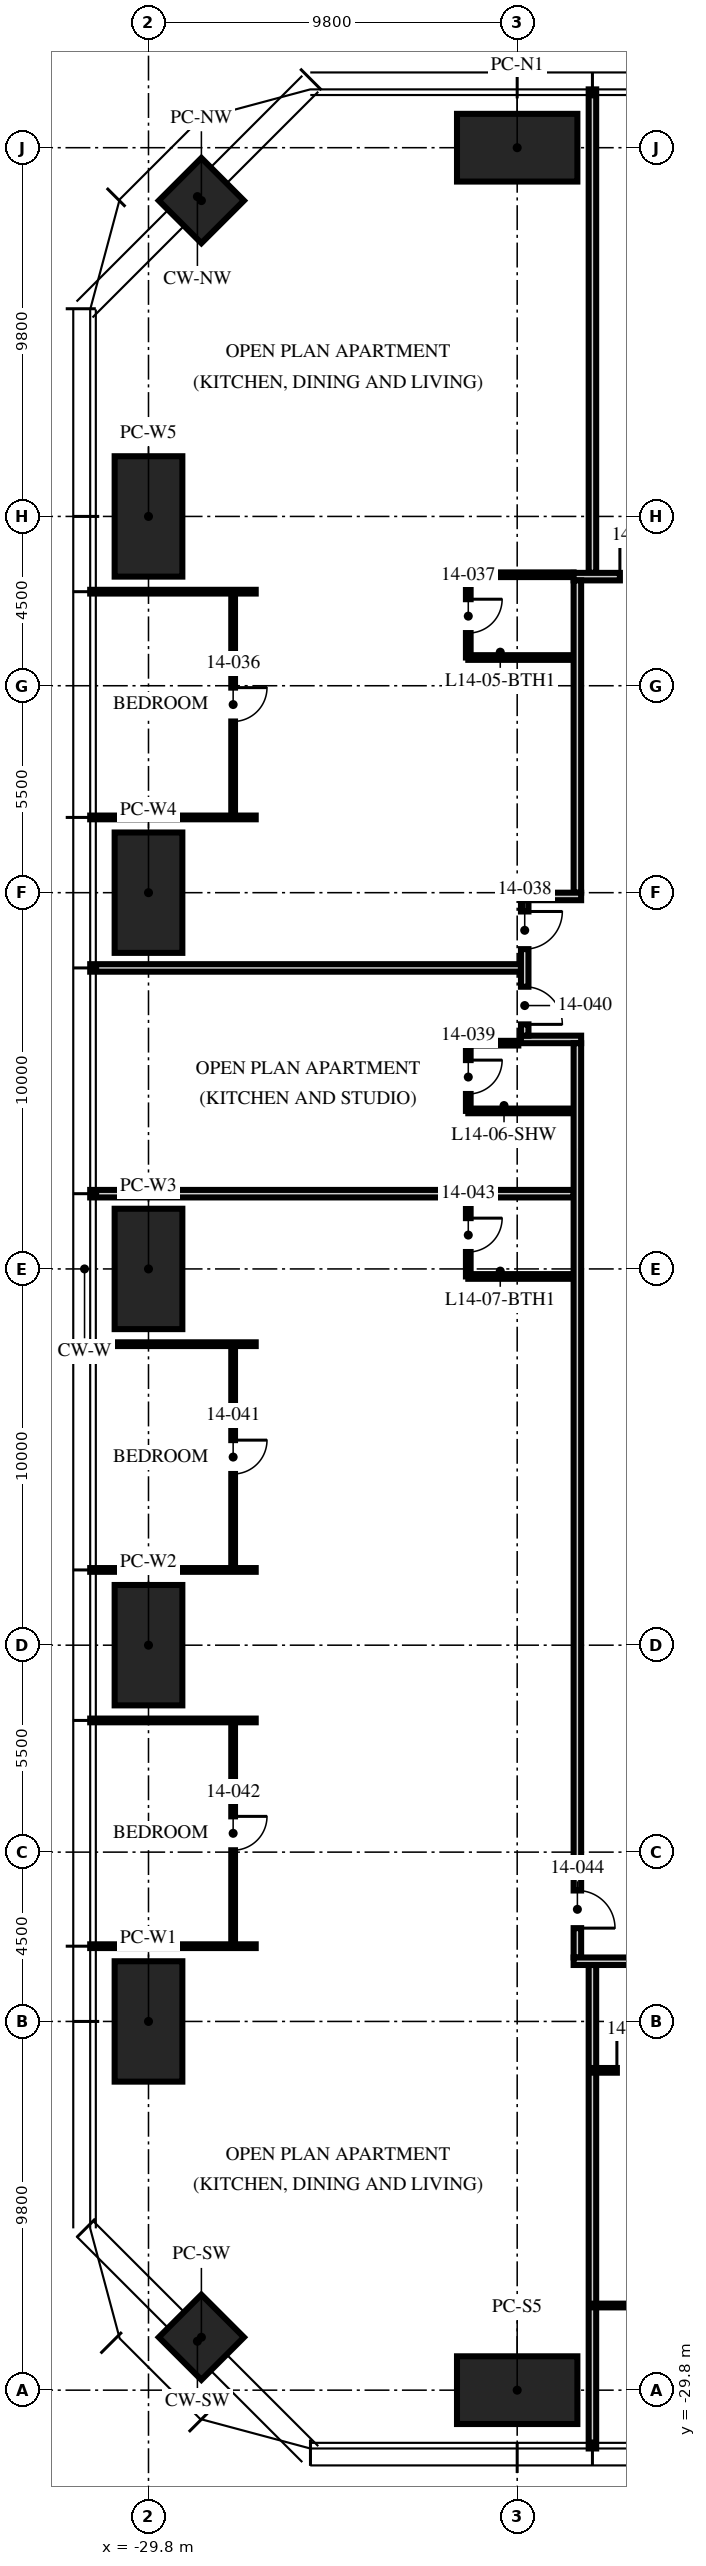
"""IFC4 building model, lengths in metres.
Left out: names, types, materials, properties, quantities, classifications, styles, units other than length and angle.
Written with IfcOpenShell. Run it as: python <this file> out.ifc"""

import sys

from ifc_helpers import new_model, si_unit, direction, frame, frame_2d, origin, origin_2d, place, context, subcontext, project, spatial, rectangle, hollow_rectangle, extrude, element, fill, save


model = new_model("IFC4")
c1 = context("Model", 3, precision=1e-05, world=origin(), true_north=direction((0.0, 1.0)))
c2 = subcontext(c1, "Body", "Model", "MODEL_VIEW")
j1 = project(units=[si_unit("LENGTHUNIT", "METRE"), si_unit("PLANEANGLEUNIT", "RADIAN")], contexts=[c1])
p1 = place(None, origin())
s1 = spatial("IfcSite", under=j1, at=p1, CompositionType="ELEMENT")
p2 = place(p1, origin())
s2 = spatial("IfcBuilding", under=s1, at=p2, CompositionType="ELEMENT")
p3 = place(p2, frame((0.0, 0.0, 58.5)))
s3 = spatial("IfcBuildingStorey", under=s2, at=p3, CompositionType="ELEMENT", Elevation=58.5)
for number, where, z_axis, x_axis in (
    (1, (-20.0, 29.8, 0.0), (0.0, 0.0, 1.0), (1.0, 0.0, 0.0)),
    (2, (-20.0, -29.8, 0.0), (0.0, 0.0, 1.0), (1.0, 0.0, 0.0)),
    (3, (-29.8, -20.0, 0.0), (0.0, 0.0, 1.0), (0.0, 1.0, 0.0)),
    (4, (-29.8, -10.0, 0.0), (0.0, 0.0, 1.0), (0.0, 1.0, 0.0)),
    (5, (-29.8, 0.0, 0.0), (0.0, 0.0, 1.0), (0.0, 1.0, 0.0)),
    (6, (-29.8, 10.0, 0.0), (0.0, 0.0, 1.0), (0.0, 1.0, 0.0)),
    (7, (-29.8, 20.0, 0.0), (0.0, 0.0, 1.0), (0.0, 1.0, 0.0)),
):
    element("IfcColumn", number, at=place(p3, frame(where, z_axis=z_axis, x_axis=x_axis)), inside=s3, PredefinedType="COLUMN", context=c2, shape_type="SweptSolid", body=[
        extrude(hollow_rectangle(XDim=3.2, YDim=1.8, WallThickness=0.2, at=origin_2d()), origin(), (0.0, 0.0, 1.0), 3.75),
    ])
for number, where, z_axis, x_axis in (
    (8, (-28.394, -28.394, 0.0), (0.0, 0.0, 1.0), (0.707, -0.707, 0.0)),
    (9, (-28.394, 28.394, 0.0), (0.0, 0.0, 1.0), (0.707, 0.707, 0.0)),
):
    element("IfcColumn", number, at=place(p3, frame(where, z_axis=z_axis, x_axis=x_axis)), inside=s3, PredefinedType="COLUMN", context=c2, shape_type="SweptSolid", body=[
        extrude(hollow_rectangle(XDim=1.6, YDim=1.6, WallThickness=0.1, at=origin_2d()), origin(), (0.0, 0.0, 1.0), 3.75),
    ])
p4 = place(p3, frame((-18.0, 18.5, 0.0), z_axis=(0.0, 0.0, 1.0), x_axis=(0.0, 1.0, 0.0)))
e10 = element("IfcWall", 10, at=p4, inside=s3, PredefinedType="PARTITIONING", context=c2, shape_type="SweptSolid", body=[
    extrude(rectangle(XDim=12.85, YDim=0.2, at=frame_2d((6.425, 0.0))), origin(), (0.0, 0.0, 1.0), 2.3),
])
for number, where, z_axis, x_axis in (
    (11, (-26.95, 18.0, 0.0), (0.0, 0.0, 1.0), (-1.0, 0.0, 0.0)),
    (12, (-26.95, 12.0, 0.0), (0.0, 0.0, 1.0), (-1.0, 0.0, 0.0)),
):
    element("IfcWall", number, at=place(p3, frame(where, z_axis=z_axis, x_axis=x_axis)), inside=s3, PredefinedType="PARTITIONING", context=c2, shape_type="SweptSolid", body=[
        extrude(rectangle(XDim=4.4, YDim=0.1, at=frame_2d((2.2, 0.0))), origin(), (0.0, 0.0, 1.0), 2.71),
    ])
p5 = place(p3, frame((-19.9, 8.0, 0.0), z_axis=(0.0, 0.0, 1.0), x_axis=(-1.0, 0.0, 0.0)))
e13 = element("IfcWall", 13, at=p5, inside=s3, PredefinedType="PARTITIONING", context=c2, shape_type="SweptSolid", body=[
    extrude(rectangle(XDim=11.45, YDim=0.2, at=frame_2d((5.725, 0.0))), origin(), (0.0, 0.0, 1.0), 2.71),
])
p6 = place(p3, frame((-18.5, 2.0, 0.0), z_axis=(0.0, 0.0, 1.0), x_axis=(-1.0, 0.0, 0.0)))
e14 = element("IfcWall", 14, at=p6, inside=s3, PredefinedType="PARTITIONING", context=c2, shape_type="SweptSolid", body=[
    extrude(rectangle(XDim=12.85, YDim=0.2, at=frame_2d((6.425, 0.0))), origin(), (0.0, 0.0, 1.0), 2.71),
])
for number, where, z_axis, x_axis in (
    (15, (-26.95, -2.0, 0.0), (0.0, 0.0, 1.0), (-1.0, 0.0, 0.0)),
    (16, (-26.95, -8.0, 0.0), (0.0, 0.0, 1.0), (-1.0, 0.0, 0.0)),
    (17, (-26.95, -12.0, 0.0), (0.0, 0.0, 1.0), (-1.0, 0.0, 0.0)),
    (18, (-26.95, -18.0, 0.0), (0.0, 0.0, 1.0), (-1.0, 0.0, 0.0)),
):
    element("IfcWall", number, at=place(p3, frame(where, z_axis=z_axis, x_axis=x_axis)), inside=s3, PredefinedType="PARTITIONING", context=c2, shape_type="SweptSolid", body=[
        extrude(rectangle(XDim=4.4, YDim=0.1, at=frame_2d((2.2, 0.0))), origin(), (0.0, 0.0, 1.0), 2.71),
    ])
p7 = place(p3, frame((-18.0, -18.5, 0.0), z_axis=(0.0, 0.0, 1.0), x_axis=(0.0, -1.0, 0.0)))
e19 = element("IfcWall", 19, at=p7, inside=s3, PredefinedType="PARTITIONING", context=c2, shape_type="SweptSolid", body=[
    extrude(rectangle(XDim=12.85, YDim=0.2, at=frame_2d((6.425, 0.0))), origin(), (0.0, 0.0, 1.0), 2.3),
])
p8 = place(p3, frame((-27.55, 18.0, 0.0), z_axis=(0.0, 0.0, 1.0), x_axis=(0.0, -1.0, 0.0)))
e20 = element("IfcWall", 20, at=p8, inside=s3, PredefinedType="PARTITIONING", context=c2, shape_type="SweptSolid", body=[
    extrude(rectangle(XDim=6.0, YDim=0.1, at=frame_2d((3.0, 0.0))), origin(), (0.0, 0.0, 1.0), 2.61),
])
p9 = place(p8, frame((2.55, 0.0, 0.0)))
e21 = element("IfcOpeningElement", 21, at=p9, cuts=e20, PredefinedType="OPENING", context=c2, shape_type="SweptSolid", body=[
    extrude(rectangle(XDim=0.9, YDim=2.1, at=frame_2d((0.45, 1.05))), frame((0.0, 0.06, 0.0), z_axis=(0.0, -1.0, 0.0), x_axis=(1.0, 0.0, 0.0)), (0.0, 0.0, 1.0), 0.12),
])
p10 = place(p3, frame((-21.3, 18.45, 0.0), z_axis=(0.0, 0.0, 1.0), x_axis=(0.0, -1.0, 0.0)))
e22 = element("IfcWall", 22, at=p10, inside=s3, PredefinedType="PARTITIONING", context=c2, shape_type="SweptSolid", body=[
    extrude(rectangle(XDim=2.2, YDim=0.125, at=frame_2d((1.1, 0.0))), origin(), (0.0, 0.0, 1.0), 3.5),
])
p11 = place(p10, frame((0.65, 0.0, 0.0)))
e23 = element("IfcOpeningElement", 23, at=p11, cuts=e22, PredefinedType="OPENING", context=c2, shape_type="SweptSolid", body=[
    extrude(rectangle(XDim=0.9, YDim=2.1, at=frame_2d((0.45, 1.05))), frame((0.0, 0.073, 0.0), z_axis=(0.0, -1.0, 0.0), x_axis=(1.0, 0.0, 0.0)), (0.0, 0.0, 1.0), 0.145),
])
p12 = place(p3, frame((-18.5, 18.45, 0.0), z_axis=(0.0, 0.0, 1.0), x_axis=(-1.0, 0.0, 0.0)))
e24 = element("IfcWall", 24, at=p12, inside=s3, PredefinedType="PARTITIONING", context=c2, shape_type="SweptSolid", body=[
    extrude(rectangle(XDim=2.8, YDim=0.125, at=frame_2d((1.4, 0.0))), origin(), (0.0, 0.0, 1.0), 2.3),
])
p13 = place(p3, frame((-18.5, 16.25, 0.0), z_axis=(0.0, 0.0, 1.0), x_axis=(-1.0, 0.0, 0.0)))
e25 = element("IfcWall", 25, at=p13, inside=s3, PredefinedType="PARTITIONING", context=c2, shape_type="SweptSolid", body=[
    extrude(rectangle(XDim=2.8, YDim=0.125, at=frame_2d((1.4, 0.0))), origin(), (0.0, 0.0, 1.0), 3.5),
])
p14 = place(p3, frame((-21.3, 6.0, 0.0), z_axis=(0.0, 0.0, 1.0), x_axis=(0.0, -1.0, 0.0)))
e26 = element("IfcWall", 26, at=p14, inside=s3, PredefinedType="PARTITIONING", context=c2, shape_type="SweptSolid", body=[
    extrude(rectangle(XDim=1.8, YDim=0.125, at=frame_2d((0.9, 0.0))), origin(), (0.0, 0.0, 1.0), 2.61),
])
p15 = place(p14, frame((0.45, 0.0, 0.0)))
e27 = element("IfcOpeningElement", 27, at=p15, cuts=e26, PredefinedType="OPENING", context=c2, shape_type="SweptSolid", body=[
    extrude(rectangle(XDim=0.9, YDim=2.1, at=frame_2d((0.45, 1.05))), frame((0.0, 0.073, 0.0), z_axis=(0.0, -1.0, 0.0), x_axis=(1.0, 0.0, 0.0)), (0.0, 0.0, 1.0), 0.145),
])
p16 = place(p3, frame((-19.97, 6.0, 0.0), z_axis=(0.0, 0.0, 1.0), x_axis=(-1.0, 0.0, 0.0)))
e28 = element("IfcWall", 28, at=p16, inside=s3, PredefinedType="PARTITIONING", context=c2, shape_type="SweptSolid", body=[
    extrude(rectangle(XDim=1.33, YDim=0.125, at=frame_2d((0.665, 0.0))), origin(), (0.0, 0.0, 1.0), 3.5),
])
p17 = place(p3, frame((-18.5, 4.2, 0.0), z_axis=(0.0, 0.0, 1.0), x_axis=(-1.0, 0.0, 0.0)))
e29 = element("IfcWall", 29, at=p17, inside=s3, PredefinedType="PARTITIONING", context=c2, shape_type="SweptSolid", body=[
    extrude(rectangle(XDim=2.8, YDim=0.125, at=frame_2d((1.4, 0.0))), origin(), (0.0, 0.0, 1.0), 3.5),
])
p18 = place(p3, frame((-27.55, -2.0, 0.0), z_axis=(0.0, 0.0, 1.0), x_axis=(0.0, -1.0, 0.0)))
e30 = element("IfcWall", 30, at=p18, inside=s3, PredefinedType="PARTITIONING", context=c2, shape_type="SweptSolid", body=[
    extrude(rectangle(XDim=6.0, YDim=0.1, at=frame_2d((3.0, 0.0))), origin(), (0.0, 0.0, 1.0), 2.61),
])
p19 = place(p18, frame((2.55, 0.0, 0.0)))
e31 = element("IfcOpeningElement", 31, at=p19, cuts=e30, PredefinedType="OPENING", context=c2, shape_type="SweptSolid", body=[
    extrude(rectangle(XDim=0.9, YDim=2.1, at=frame_2d((0.45, 1.05))), frame((0.0, 0.06, 0.0), z_axis=(0.0, -1.0, 0.0), x_axis=(1.0, 0.0, 0.0)), (0.0, 0.0, 1.0), 0.12),
])
p20 = place(p3, frame((-27.55, -12.0, 0.0), z_axis=(0.0, 0.0, 1.0), x_axis=(0.0, -1.0, 0.0)))
e32 = element("IfcWall", 32, at=p20, inside=s3, PredefinedType="PARTITIONING", context=c2, shape_type="SweptSolid", body=[
    extrude(rectangle(XDim=6.0, YDim=0.1, at=frame_2d((3.0, 0.0))), origin(), (0.0, 0.0, 1.0), 2.61),
])
p21 = place(p20, frame((2.55, 0.0, 0.0)))
e33 = element("IfcOpeningElement", 33, at=p21, cuts=e32, PredefinedType="OPENING", context=c2, shape_type="SweptSolid", body=[
    extrude(rectangle(XDim=0.9, YDim=2.1, at=frame_2d((0.45, 1.05))), frame((0.0, 0.06, 0.0), z_axis=(0.0, -1.0, 0.0), x_axis=(1.0, 0.0, 0.0)), (0.0, 0.0, 1.0), 0.12),
])
p22 = place(p3, frame((-21.3, 2.0, 0.0), z_axis=(0.0, 0.0, 1.0), x_axis=(0.0, -1.0, 0.0)))
e34 = element("IfcWall", 34, at=p22, inside=s3, PredefinedType="PARTITIONING", context=c2, shape_type="SweptSolid", body=[
    extrude(rectangle(XDim=2.2, YDim=0.125, at=frame_2d((1.1, 0.0))), origin(), (0.0, 0.0, 1.0), 2.492),
])
p23 = place(p22, frame((0.65, 0.0, 0.0)))
e35 = element("IfcOpeningElement", 35, at=p23, cuts=e34, PredefinedType="OPENING", context=c2, shape_type="SweptSolid", body=[
    extrude(rectangle(XDim=0.9, YDim=2.1, at=frame_2d((0.45, 1.05))), frame((0.0, 0.073, 0.0), z_axis=(0.0, -1.0, 0.0), x_axis=(1.0, 0.0, 0.0)), (0.0, 0.0, 1.0), 0.145),
])
p24 = place(p3, frame((-18.5, -0.2, 0.0), z_axis=(0.0, 0.0, 1.0), x_axis=(-1.0, 0.0, 0.0)))
e36 = element("IfcWall", 36, at=p24, inside=s3, PredefinedType="PARTITIONING", context=c2, shape_type="SweptSolid", body=[
    extrude(rectangle(XDim=2.8, YDim=0.125, at=frame_2d((1.4, 0.0))), origin(), (0.0, 0.0, 1.0), 2.492),
])
p25 = place(p3, frame((-18.0, -27.55, 0.0), z_axis=(0.0, 0.0, 1.0), x_axis=(1.0, 0.0, 0.0)))
e37 = element("IfcWall", 37, at=p25, inside=s3, PredefinedType="PARTITIONING", context=c2, shape_type="SweptSolid", body=[
    extrude(rectangle(XDim=6.0, YDim=0.1, at=frame_2d((3.0, 0.0))), origin(), (0.0, 0.0, 1.0), 2.61),
])
p26 = place(p25, frame((2.55, 0.0, 0.0)))
e38 = element("IfcOpeningElement", 38, at=p26, cuts=e37, PredefinedType="OPENING", context=c2, shape_type="SweptSolid", body=[
    extrude(rectangle(XDim=0.9, YDim=2.1, at=frame_2d((0.45, 1.05))), frame((0.0, 0.06, 0.0), z_axis=(0.0, -1.0, 0.0), x_axis=(1.0, 0.0, 0.0)), (0.0, 0.0, 1.0), 0.12),
])
p27 = place(p3, frame((-18.0, -21.3, 0.0), z_axis=(0.0, 0.0, 1.0), x_axis=(1.0, 0.0, 0.0)))
e39 = element("IfcWall", 39, at=p27, inside=s3, PredefinedType="PARTITIONING", context=c2, shape_type="SweptSolid", body=[
    extrude(rectangle(XDim=2.2, YDim=0.125, at=frame_2d((1.1, 0.0))), origin(), (0.0, 0.0, 1.0), 3.5),
])
p28 = place(p27, frame((0.65, 0.0, 0.0)))
e40 = element("IfcOpeningElement", 40, at=p28, cuts=e39, PredefinedType="OPENING", context=c2, shape_type="SweptSolid", body=[
    extrude(rectangle(XDim=0.9, YDim=2.1, at=frame_2d((0.45, 1.05))), frame((0.0, 0.073, 0.0), z_axis=(0.0, -1.0, 0.0), x_axis=(1.0, 0.0, 0.0)), (0.0, 0.0, 1.0), 0.145),
])
p29 = place(p3, frame((-18.5, 18.4, 0.0), z_axis=(0.0, 0.0, 1.0), x_axis=(1.0, 0.0, 0.0)))
e41 = element("IfcWall", 41, at=p29, inside=s3, PredefinedType="PARTITIONING", context=c2, shape_type="SweptSolid", body=[
    extrude(rectangle(XDim=37.0, YDim=0.2, at=frame_2d((18.5, 0.0))), origin(), (0.0, 0.0, 1.0), 2.3),
])
p30 = place(p29, frame((1.23, 0.0, 0.0)))
e42 = element("IfcOpeningElement", 42, at=p30, cuts=e41, PredefinedType="OPENING", context=c2, shape_type="SweptSolid", body=[
    extrude(rectangle(XDim=1.0, YDim=2.2, at=frame_2d((0.5, 1.1))), frame((0.0, 0.11, 0.0), z_axis=(0.0, -1.0, 0.0), x_axis=(1.0, 0.0, 0.0)), (0.0, 0.0, 1.0), 0.22),
])
p31 = place(p3, frame((-18.4, 18.3, 0.0), z_axis=(0.0, 0.0, 1.0), x_axis=(0.0, -1.0, 0.0)))
e43 = element("IfcWall", 43, at=p31, inside=s3, PredefinedType="PARTITIONING", context=c2, shape_type="SweptSolid", body=[
    extrude(rectangle(XDim=8.3, YDim=0.2, at=frame_2d((4.15, 0.0))), origin(), (0.0, 0.0, 1.0), 2.3),
])
p32 = place(p3, frame((-18.3, 9.9, 0.0), z_axis=(0.0, 0.0, 1.0), x_axis=(-1.0, 0.0, 0.0)))
e44 = element("IfcWall", 44, at=p32, inside=s3, PredefinedType="PARTITIONING", context=c2, shape_type="SweptSolid", body=[
    extrude(rectangle(XDim=1.6, YDim=0.2, at=frame_2d((0.8, 0.0))), origin(), (0.0, 0.0, 1.0), 2.492),
])
p33 = place(p3, frame((-18.3, 6.1, 0.0), z_axis=(0.0, 0.0, 1.0), x_axis=(-1.0, 0.0, 0.0)))
e45 = element("IfcWall", 45, at=p33, inside=s3, PredefinedType="PARTITIONING", context=c2, shape_type="SweptSolid", body=[
    extrude(rectangle(XDim=1.6, YDim=0.2, at=frame_2d((0.8, 0.0))), origin(), (0.0, 0.0, 1.0), 3.5),
])
p34 = place(p3, frame((-19.8, 9.8, 0.0), z_axis=(0.0, 0.0, 1.0), x_axis=(0.0, -1.0, 0.0)))
e46 = element("IfcWall", 46, at=p34, inside=s3, PredefinedType="PARTITIONING", context=c2, shape_type="SweptSolid", body=[
    extrude(rectangle(XDim=3.6, YDim=0.2, at=frame_2d((1.8, 0.0))), origin(), (0.0, 0.0, 1.0), 3.5),
])
p35 = place(p34, frame((0.3, 0.0, 0.0)))
e47 = element("IfcOpeningElement", 47, at=p35, cuts=e46, PredefinedType="OPENING", context=c2, shape_type="SweptSolid", body=[
    extrude(rectangle(XDim=1.0, YDim=2.2, at=frame_2d((0.5, 1.1))), frame((0.0, 0.11, 0.0), z_axis=(0.0, -1.0, 0.0), x_axis=(1.0, 0.0, 0.0)), (0.0, 0.0, 1.0), 0.22),
])
p36 = place(p34, frame((2.3, 0.0, 0.0)))
e48 = element("IfcOpeningElement", 48, at=p36, cuts=e46, PredefinedType="OPENING", context=c2, shape_type="SweptSolid", body=[
    extrude(rectangle(XDim=1.0, YDim=2.2, at=frame_2d((0.5, 1.1))), frame((0.0, 0.11, 0.0), z_axis=(0.0, -1.0, 0.0), x_axis=(1.0, 0.0, 0.0)), (0.0, 0.0, 1.0), 0.22),
])
p37 = place(p3, frame((-18.4, 6.0, 0.0), z_axis=(0.0, 0.0, 1.0), x_axis=(0.0, -1.0, 0.0)))
e49 = element("IfcWall", 49, at=p37, inside=s3, PredefinedType="PARTITIONING", context=c2, shape_type="SweptSolid", body=[
    extrude(rectangle(XDim=24.3, YDim=0.2, at=frame_2d((12.15, 0.0))), origin(), (0.0, 0.0, 1.0), 2.3),
])
p38 = place(p37, frame((22.52, 0.0, 0.0)))
e50 = element("IfcOpeningElement", 50, at=p38, cuts=e49, PredefinedType="OPENING", context=c2, shape_type="SweptSolid", body=[
    extrude(rectangle(XDim=1.0, YDim=2.2, at=frame_2d((0.5, 1.1))), frame((0.0, 0.11, 0.0), z_axis=(0.0, -1.0, 0.0), x_axis=(1.0, 0.0, 0.0)), (0.0, 0.0, 1.0), 0.22),
])
p39 = place(p3, frame((-4.0, -18.4, 0.0), z_axis=(0.0, 0.0, 1.0), x_axis=(-1.0, 0.0, 0.0)))
e51 = element("IfcWall", 51, at=p39, inside=s3, PredefinedType="PARTITIONING", context=c2, shape_type="SweptSolid", body=[
    extrude(rectangle(XDim=14.5, YDim=0.2, at=frame_2d((7.25, 0.0))), origin(), (0.0, 0.0, 1.0), 2.3),
])
p40 = place(p39, frame((4.73, 0.0, 0.0)))
e52 = element("IfcOpeningElement", 52, at=p40, cuts=e51, PredefinedType="OPENING", context=c2, shape_type="SweptSolid", body=[
    extrude(rectangle(XDim=1.0, YDim=2.2, at=frame_2d((0.5, 1.1))), frame((0.0, 0.11, 0.0), z_axis=(0.0, -1.0, 0.0), x_axis=(1.0, 0.0, 0.0)), (0.0, 0.0, 1.0), 0.22),
])
p41 = place(p30, origin())
e53 = element("IfcDoor", 53, at=p41, inside=s3, OperationType="SINGLE_SWING_LEFT", PredefinedType="DOOR", context=c2, shape_type="SweptSolid", body=[
    extrude(rectangle(XDim=1.0, YDim=2.2, at=frame_2d((0.5, 1.1))), frame((0.0, 0.025, 0.0), z_axis=(0.0, -1.0, 0.0), x_axis=(1.0, 0.0, 0.0)), (0.0, 0.0, 1.0), 0.05),
])
fill(e42, e53)
p42 = place(p9, origin())
e54 = element("IfcDoor", 54, at=p42, inside=s3, OperationType="SINGLE_SWING_LEFT", PredefinedType="DOOR", context=c2, shape_type="SweptSolid", body=[
    extrude(rectangle(XDim=0.9, YDim=2.1, at=frame_2d((0.45, 1.05))), frame((0.0, 0.025, 0.0), z_axis=(0.0, -1.0, 0.0), x_axis=(1.0, 0.0, 0.0)), (0.0, 0.0, 1.0), 0.05),
])
fill(e21, e54)
p43 = place(p11, origin())
e55 = element("IfcDoor", 55, at=p43, inside=s3, OperationType="SINGLE_SWING_LEFT", PredefinedType="DOOR", context=c2, shape_type="SweptSolid", body=[
    extrude(rectangle(XDim=0.9, YDim=2.1, at=frame_2d((0.45, 1.05))), frame((0.0, 0.025, 0.0), z_axis=(0.0, -1.0, 0.0), x_axis=(1.0, 0.0, 0.0)), (0.0, 0.0, 1.0), 0.05),
])
fill(e23, e55)
p44 = place(p35, origin())
e56 = element("IfcDoor", 56, at=p44, inside=s3, OperationType="SINGLE_SWING_LEFT", PredefinedType="DOOR", context=c2, shape_type="SweptSolid", body=[
    extrude(rectangle(XDim=1.0, YDim=2.2, at=frame_2d((0.5, 1.1))), frame((0.0, 0.025, 0.0), z_axis=(0.0, -1.0, 0.0), x_axis=(1.0, 0.0, 0.0)), (0.0, 0.0, 1.0), 0.05),
])
fill(e47, e56)
p45 = place(p15, origin())
e57 = element("IfcDoor", 57, at=p45, inside=s3, OperationType="SINGLE_SWING_LEFT", PredefinedType="DOOR", context=c2, shape_type="SweptSolid", body=[
    extrude(rectangle(XDim=0.9, YDim=2.1, at=frame_2d((0.45, 1.05))), frame((0.0, 0.025, 0.0), z_axis=(0.0, -1.0, 0.0), x_axis=(1.0, 0.0, 0.0)), (0.0, 0.0, 1.0), 0.05),
])
fill(e27, e57)
p46 = place(p36, origin())
e58 = element("IfcDoor", 58, at=p46, inside=s3, OperationType="SINGLE_SWING_RIGHT", PredefinedType="DOOR", context=c2, shape_type="SweptSolid", body=[
    extrude(rectangle(XDim=1.0, YDim=2.2, at=frame_2d((0.5, 1.1))), frame((0.0, 0.025, 0.0), z_axis=(0.0, -1.0, 0.0), x_axis=(1.0, 0.0, 0.0)), (0.0, 0.0, 1.0), 0.05),
])
fill(e48, e58)
p47 = place(p19, origin())
e59 = element("IfcDoor", 59, at=p47, inside=s3, OperationType="SINGLE_SWING_LEFT", PredefinedType="DOOR", context=c2, shape_type="SweptSolid", body=[
    extrude(rectangle(XDim=0.9, YDim=2.1, at=frame_2d((0.45, 1.05))), frame((0.0, 0.025, 0.0), z_axis=(0.0, -1.0, 0.0), x_axis=(1.0, 0.0, 0.0)), (0.0, 0.0, 1.0), 0.05),
])
fill(e31, e59)
p48 = place(p21, origin())
e60 = element("IfcDoor", 60, at=p48, inside=s3, OperationType="SINGLE_SWING_LEFT", PredefinedType="DOOR", context=c2, shape_type="SweptSolid", body=[
    extrude(rectangle(XDim=0.9, YDim=2.1, at=frame_2d((0.45, 1.05))), frame((0.0, 0.025, 0.0), z_axis=(0.0, -1.0, 0.0), x_axis=(1.0, 0.0, 0.0)), (0.0, 0.0, 1.0), 0.05),
])
fill(e33, e60)
p49 = place(p23, origin())
e61 = element("IfcDoor", 61, at=p49, inside=s3, OperationType="SINGLE_SWING_LEFT", PredefinedType="DOOR", context=c2, shape_type="SweptSolid", body=[
    extrude(rectangle(XDim=0.9, YDim=2.1, at=frame_2d((0.45, 1.05))), frame((0.0, 0.025, 0.0), z_axis=(0.0, -1.0, 0.0), x_axis=(1.0, 0.0, 0.0)), (0.0, 0.0, 1.0), 0.05),
])
fill(e35, e61)
p50 = place(p38, origin())
e62 = element("IfcDoor", 62, at=p50, inside=s3, OperationType="SINGLE_SWING_RIGHT", PredefinedType="DOOR", context=c2, shape_type="SweptSolid", body=[
    extrude(rectangle(XDim=1.0, YDim=2.2, at=frame_2d((0.5, 1.1))), frame((0.0, 0.025, 0.0), z_axis=(0.0, -1.0, 0.0), x_axis=(1.0, 0.0, 0.0)), (0.0, 0.0, 1.0), 0.05),
])
fill(e50, e62)
p51 = place(p28, origin())
e63 = element("IfcDoor", 63, at=p51, inside=s3, OperationType="SINGLE_SWING_LEFT", PredefinedType="DOOR", context=c2, shape_type="SweptSolid", body=[
    extrude(rectangle(XDim=0.9, YDim=2.1, at=frame_2d((0.45, 1.05))), frame((0.0, 0.025, 0.0), z_axis=(0.0, -1.0, 0.0), x_axis=(1.0, 0.0, 0.0)), (0.0, 0.0, 1.0), 0.05),
])
fill(e40, e63)
save(model, sys.argv[1])
